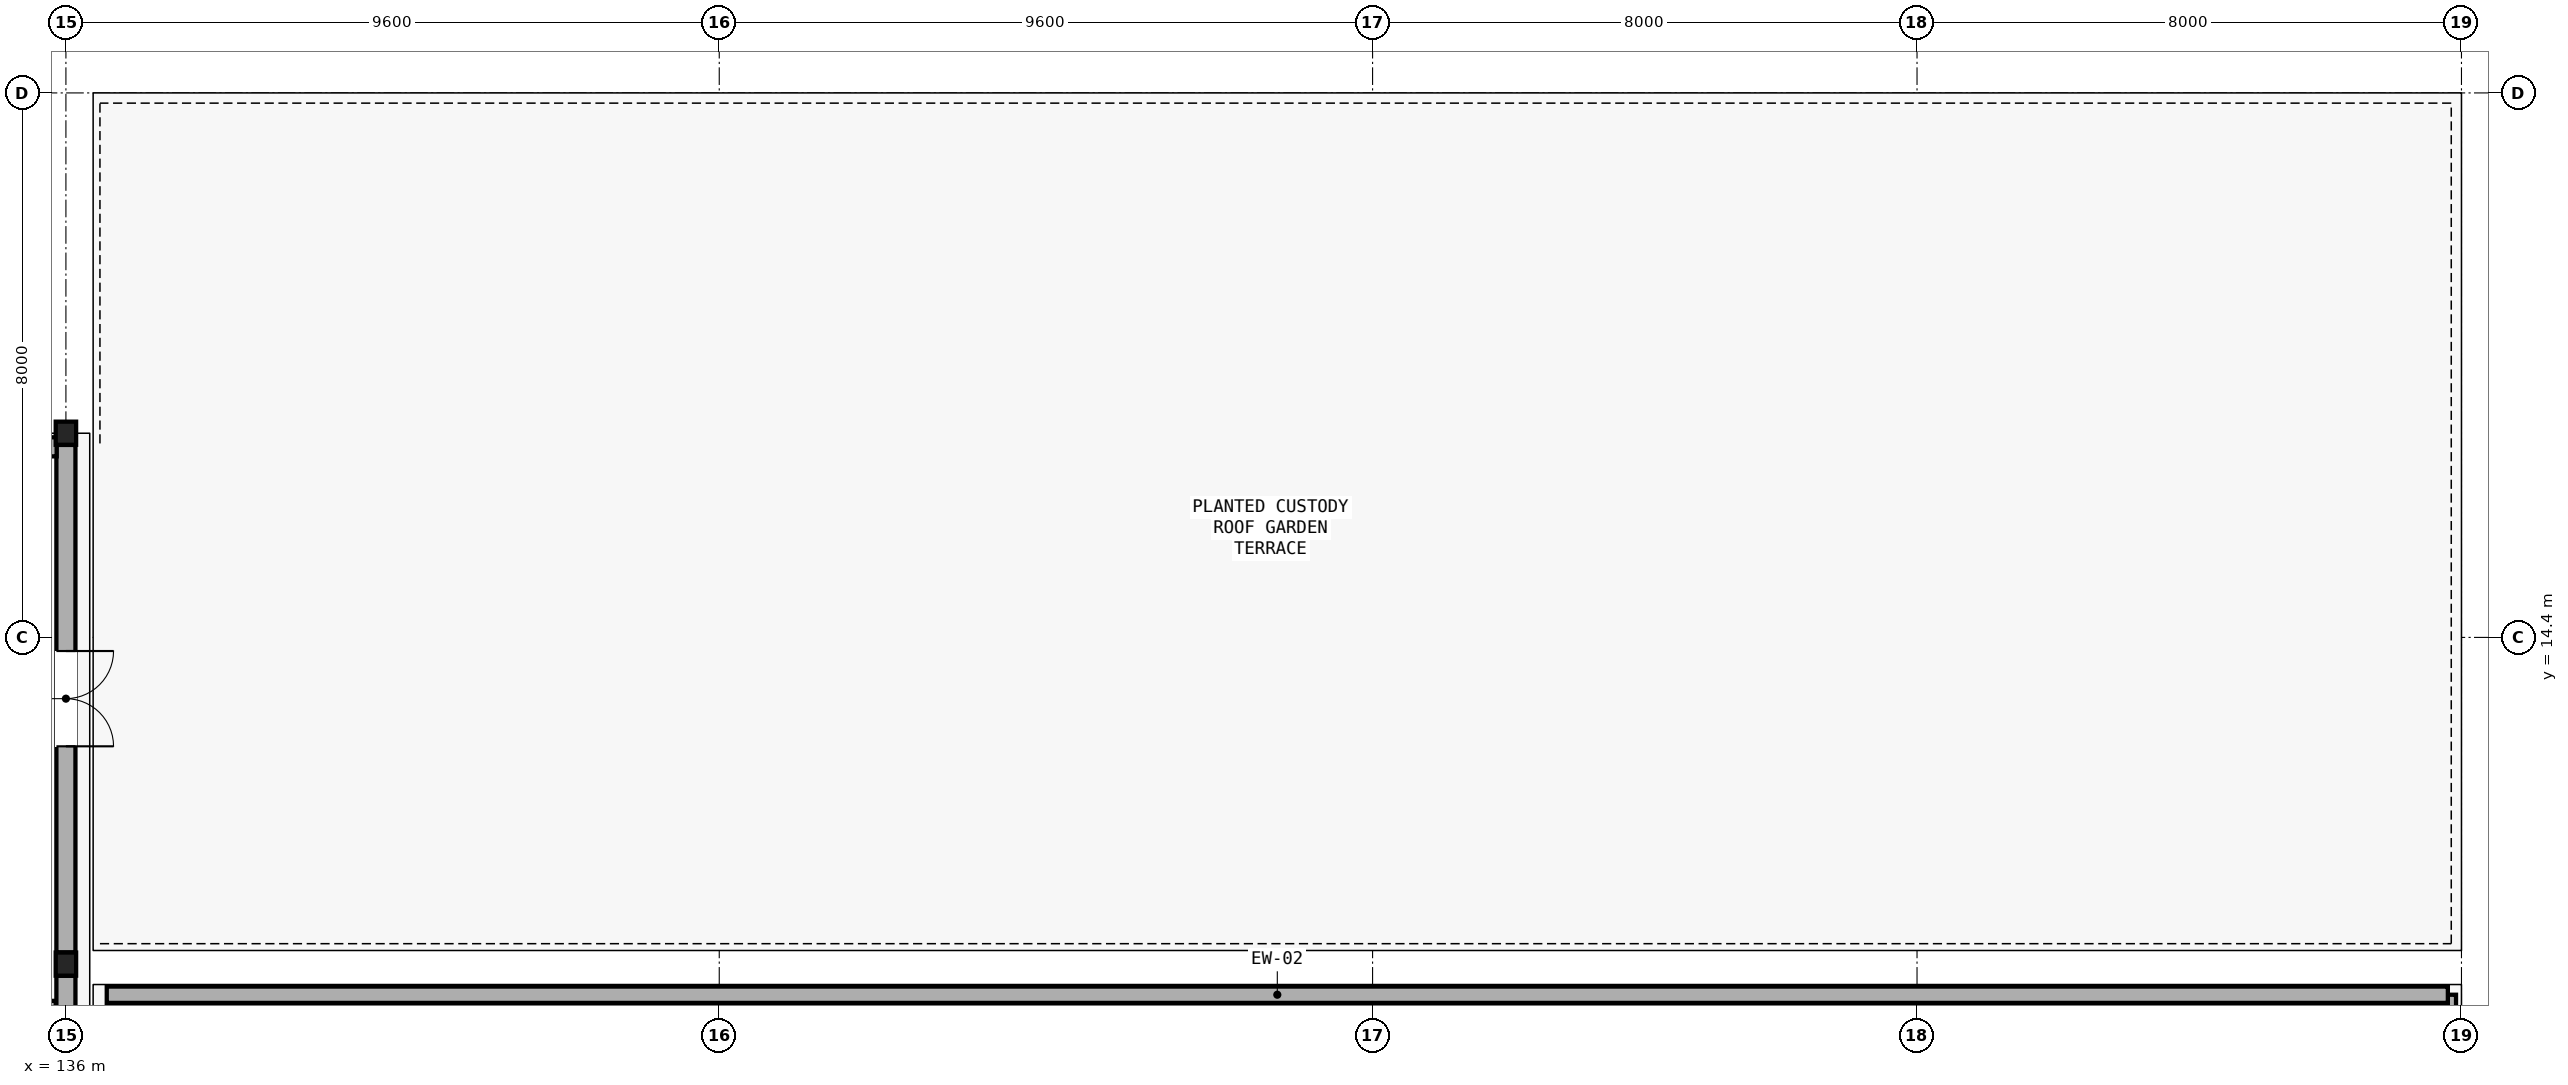
"""IFC4 building model, lengths in metres.
Left out: names, types, materials, properties, quantities, classifications, styles, units other than length and angle.
Written with IfcOpenShell. Run it as: python <this file> out.ifc"""

import sys

from ifc_helpers import new_model, si_unit, direction, frame, frame_2d, origin, origin_2d, place, context, subcontext, project, spatial, rectangle, i_section, extrude, element, fill, save


model = new_model("IFC4")
c1 = context("Model", 3, precision=1e-05, world=origin(), true_north=direction((0.0, 1.0)))
c2 = subcontext(c1, "Body", "Model", "MODEL_VIEW")
j1 = project(units=[si_unit("LENGTHUNIT", "METRE"), si_unit("PLANEANGLEUNIT", "RADIAN")], contexts=[c1])
p1 = place(None, origin())
s1 = spatial("IfcSite", under=j1, at=p1, CompositionType="ELEMENT")
p2 = place(p1, origin())
s2 = spatial("IfcBuilding", under=s1, at=p2, CompositionType="ELEMENT")
p3 = place(p2, frame((0.0, 0.0, 13.65)))
s3 = spatial("IfcBuildingStorey", under=s2, at=p3, CompositionType="ELEMENT", Elevation=13.65)
for number, where, z_axis, x_axis in (
    (1, (136.0, 9.6, 0.0), (0.0, 0.0, 1.0), (1.0, 0.0, 0.0)),
    (2, (136.0, 17.4, 0.0), (0.0, 0.0, 1.0), (1.0, 0.0, 0.0)),
):
    element("IfcColumn", number, at=place(p3, frame(where, z_axis=z_axis, x_axis=x_axis)), inside=s3, PredefinedType="COLUMN", context=c2, shape_type="SweptSolid", body=[
        extrude(i_section(OverallWidth=0.3, OverallDepth=0.34, WebThickness=0.012, FlangeThickness=0.021, FilletRadius=0.027, at=origin_2d()), origin(), (0.0, 0.0, 1.0), 4.2),
    ])
p4 = place(p3, frame((136.0, 9.772, 0.0), z_axis=(0.0, 0.0, 1.0), x_axis=(0.0, 1.0, 0.0)))
e3 = element("IfcWall", 3, at=p4, inside=s3, PredefinedType="SOLIDWALL", context=c2, shape_type="SweptSolid", body=[
    extrude(rectangle(XDim=7.456, YDim=0.28, at=frame_2d((3.728, 0.0))), origin(), (0.0, 0.0, 1.0), 3.555),
])
p5 = place(p4, frame((3.028, 0.0, 0.0)))
e4 = element("IfcOpeningElement", 4, at=p5, cuts=e3, PredefinedType="OPENING", context=c2, shape_type="SweptSolid", body=[
    extrude(rectangle(XDim=1.4, YDim=2.15, at=frame_2d((0.7, 1.075))), frame((0.0, 0.15, 0.0), z_axis=(0.0, -1.0, 0.0), x_axis=(1.0, 0.0, 0.0)), (0.0, 0.0, 1.0), 0.3),
])
p6 = place(p3, frame((136.0, 0.172, 0.0), z_axis=(0.0, 0.0, 1.0), x_axis=(0.0, 1.0, 0.0)))
e5 = element("IfcWall", 5, at=p6, inside=s3, PredefinedType="SOLIDWALL", context=c2, shape_type="SweptSolid", body=[
    extrude(rectangle(XDim=9.256, YDim=0.28, at=frame_2d((4.628, 0.0))), origin(), (0.0, 0.0, 1.0), 3.555),
])
p7 = place(p6, frame((6.028, 0.0, 0.9)))
e6 = element("IfcOpeningElement", 6, at=p7, cuts=e5, PredefinedType="OPENING", context=c2, shape_type="SweptSolid", body=[
    extrude(rectangle(XDim=1.6, YDim=1.45, at=frame_2d((0.8, 0.725))), frame((0.0, 0.15, 0.0), z_axis=(0.0, -1.0, 0.0), x_axis=(1.0, 0.0, 0.0)), (0.0, 0.0, 1.0), 0.3),
])
p8 = place(p3, frame((126.26, 17.2, 0.0), z_axis=(0.0, 0.0, 1.0), x_axis=(1.0, 0.0, 0.0)))
e7 = element("IfcWall", 7, at=p8, inside=s3, PredefinedType="SOLIDWALL", context=c2, shape_type="SweptSolid", body=[
    extrude(rectangle(XDim=9.604, YDim=0.28, at=frame_2d((4.802, 0.0))), origin(), (0.0, 0.0, 1.0), 3.635),
])
p9 = place(p8, frame((1.998, 0.0, 0.9)))
e8 = element("IfcOpeningElement", 8, at=p9, cuts=e7, PredefinedType="OPENING", context=c2, shape_type="SweptSolid", body=[
    extrude(rectangle(XDim=1.75, YDim=1.45, at=frame_2d((0.875, 0.725))), frame((0.0, 0.15, 0.0), z_axis=(0.0, -1.0, 0.0), x_axis=(1.0, 0.0, 0.0)), (0.0, 0.0, 1.0), 0.3),
])
p10 = place(p8, frame((5.032, 0.0, 0.9)))
e9 = element("IfcOpeningElement", 9, at=p10, cuts=e7, PredefinedType="OPENING", context=c2, shape_type="SweptSolid", body=[
    extrude(rectangle(XDim=1.75, YDim=1.45, at=frame_2d((0.875, 0.725))), frame((0.0, 0.15, 0.0), z_axis=(0.0, -1.0, 0.0), x_axis=(1.0, 0.0, 0.0)), (0.0, 0.0, 1.0), 0.3),
])
p11 = place(p3, frame((171.0, 0.2, 0.0), z_axis=(0.0, 0.0, 1.0), x_axis=(0.0, 1.0, 0.0)))
e10 = element("IfcWall", 10, at=p11, inside=s3, PredefinedType="PARAPET", context=c2, shape_type="SweptSolid", body=[
    extrude(rectangle(XDim=8.95, YDim=0.24, at=frame_2d((4.475, 0.0))), origin(), (0.0, 0.0, 1.0), 1.1),
])
p12 = place(p3, frame((171.0, 9.15, 0.0), z_axis=(0.0, 0.0, 1.0), x_axis=(-1.0, 0.0, 0.0)))
e11 = element("IfcWall", 11, at=p12, inside=s3, PredefinedType="PARAPET", context=c2, shape_type="SweptSolid", body=[
    extrude(rectangle(XDim=34.4, YDim=0.24, at=frame_2d((17.2, 0.0))), origin(), (0.0, 0.0, 1.0), 1.1),
])
p13 = place(p3, frame((133.55, 9.0, 0.0), z_axis=(0.0, 0.0, 1.0), x_axis=(1.0, 0.0, 0.0)))
e12 = element("IfcWall", 12, at=p13, inside=s3, PredefinedType="PARTITIONING", context=c2, shape_type="SweptSolid", body=[
    extrude(rectangle(XDim=2.3, YDim=0.12, at=frame_2d((1.15, 0.0))), origin(), (0.0, 0.0, 1.0), 3.98),
])
p14 = place(p13, frame((0.44, 0.0, 0.0)))
e13 = element("IfcOpeningElement", 13, at=p14, cuts=e12, PredefinedType="OPENING", context=c2, shape_type="SweptSolid", body=[
    extrude(rectangle(XDim=0.92, YDim=2.08, at=frame_2d((0.46, 1.04))), frame((0.0, 0.07, 0.0), z_axis=(0.0, -1.0, 0.0), x_axis=(1.0, 0.0, 0.0)), (0.0, 0.0, 1.0), 0.14),
])
p15 = place(p5, frame((1.4, 0.0, 0.0), z_axis=(0.0, 0.0, 1.0), x_axis=(-1.0, 0.0, 0.0)))
e14 = element("IfcDoor", 14, at=p15, inside=s3, OperationType="SINGLE_SWING_LEFT", PredefinedType="DOOR", context=c2, shape_type="SweptSolid", body=[
    extrude(rectangle(XDim=1.4, YDim=2.15, at=frame_2d((0.7, 1.075))), frame((0.0, 0.025, 0.0), z_axis=(0.0, -1.0, 0.0), x_axis=(1.0, 0.0, 0.0)), (0.0, 0.0, 1.0), 0.05),
])
fill(e4, e14)
save(model, sys.argv[1])
